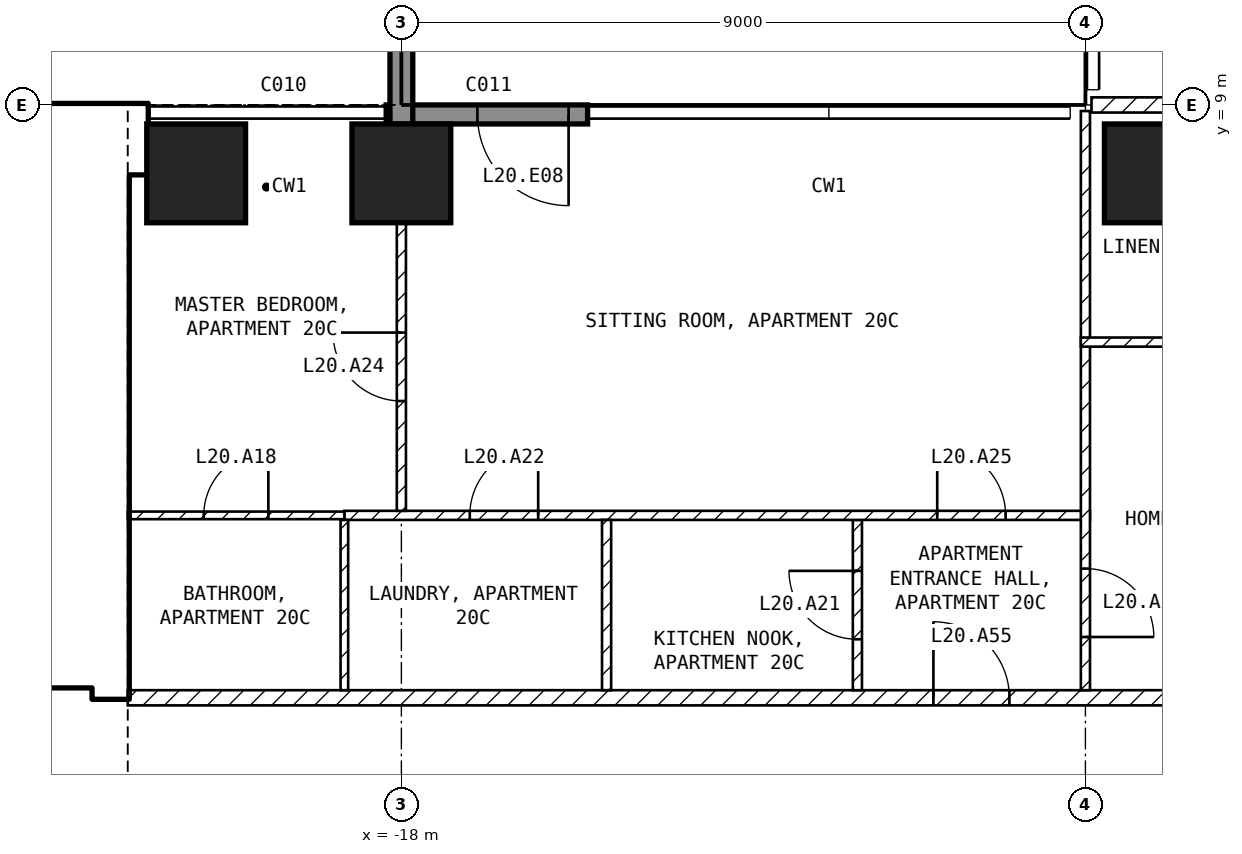
"""IFC4 building model, lengths in metres.
Left out: names, types, materials, properties, quantities, classifications, styles, units other than length and angle.
Written with IfcOpenShell. Run it as: python <this file> out.ifc"""

import sys

from ifc_helpers import new_model, si_unit, direction, frame, frame_2d, origin, origin_2d, place, context, subcontext, project, spatial, rectangle, extrude, element, fill, save


model = new_model("IFC4")
c1 = context("Model", 3, precision=1e-05, world=origin(), true_north=direction((0.0, 1.0)))
c2 = subcontext(c1, "Body", "Model", "MODEL_VIEW")
j1 = project(units=[si_unit("LENGTHUNIT", "METRE"), si_unit("PLANEANGLEUNIT", "RADIAN")], contexts=[c1])
p1 = place(None, origin())
s1 = spatial("IfcSite", under=j1, at=p1, CompositionType="ELEMENT")
p2 = place(p1, origin())
s2 = spatial("IfcBuilding", under=s1, at=p2, CompositionType="ELEMENT")
p3 = place(p2, frame((0.0, 0.0, 89.0)))
s3 = spatial("IfcBuildingStorey", under=s2, at=p3, CompositionType="ELEMENT", Elevation=89.0)
for number, where, z_axis, x_axis in (
    (1, (-20.7, 8.1, -0.25), (0.0, 0.0, 1.0), (1.0, 0.0, 0.0)),
    (2, (-18.0, 8.1, -0.25), (0.0, 0.0, 1.0), (1.0, 0.0, 0.0)),
    (3, (-8.1, 8.1, -0.25), (0.0, 0.0, 1.0), (1.0, 0.0, 0.0)),
):
    element("IfcColumn", number, at=place(p3, frame(where, z_axis=z_axis, x_axis=x_axis)), inside=s3, PredefinedType="COLUMN", context=c2, shape_type="SweptSolid", body=[
        extrude(rectangle(XDim=1.3, YDim=1.3, at=origin_2d()), origin(), (0.0, 0.0, 1.0), 3.45),
    ])
p4 = place(p3, frame((-15.55, 8.875, 0.0), z_axis=(0.0, 0.0, 1.0), x_axis=(-1.0, 0.0, 0.0)))
e4 = element("IfcWall", 4, at=p4, inside=s3, PredefinedType="SOLIDWALL", context=c2, shape_type="SweptSolid", body=[
    extrude(rectangle(XDim=2.65, YDim=0.25, at=frame_2d((1.325, 0.0))), origin(), (0.0, 0.0, 1.0), 3.2),
])
p5 = place(p4, frame((0.25, 0.0, 0.0)))
e5 = element("IfcOpeningElement", 5, at=p5, cuts=e4, PredefinedType="OPENING", context=c2, shape_type="SweptSolid", body=[
    extrude(rectangle(XDim=1.2, YDim=2.4, at=frame_2d((0.6, 1.2))), frame((0.0, 0.135, 0.0), z_axis=(0.0, -1.0, 0.0), x_axis=(1.0, 0.0, 0.0)), (0.0, 0.0, 1.0), 0.27),
])
p6 = place(p3, frame((-18.0, 8.75, 0.0), z_axis=(0.0, 0.0, 1.0), x_axis=(0.0, 1.0, 0.0)))
e6 = element("IfcWall", 6, at=p6, inside=s3, PredefinedType="SOLIDWALL", context=c2, shape_type="SweptSolid", body=[
    extrude(rectangle(XDim=2.95, YDim=0.3, at=frame_2d((1.475, 0.0))), origin(), (0.0, 0.0, 1.0), 3.2),
])
p7 = place(p3, frame((-31.5, 8.55, 0.0), z_axis=(0.0, 0.0, 1.0), x_axis=(1.0, 0.0, 0.0)))
e7 = element("IfcWall", 7, at=p7, inside=s3, PredefinedType="SHEAR", context=c2, shape_type="SweptSolid", body=[
    extrude(rectangle(XDim=10.15, YDim=0.9, at=frame_2d((5.075, 0.0))), origin(), (0.0, 0.0, 1.0), 3.2),
])
p8 = place(p3, frame((-21.825, 1.2, 0.0), z_axis=(0.0, 0.0, 1.0), x_axis=(0.0, 1.0, 0.0)))
e8 = element("IfcWall", 8, at=p8, inside=s3, PredefinedType="SHEAR", context=c2, shape_type="SweptSolid", body=[
    extrude(rectangle(XDim=6.9, YDim=0.45, at=frame_2d((3.45, 0.0))), origin(), (0.0, 0.0, 1.0), 3.2),
])
p9 = place(p3, frame((-35.1, 1.45, 0.0), z_axis=(0.0, 0.0, 1.0), x_axis=(1.0, 0.0, 0.0)))
e9 = element("IfcWall", 9, at=p9, inside=s3, PredefinedType="SOLIDWALL", context=c2, shape_type="SweptSolid", body=[
    extrude(rectangle(XDim=13.05, YDim=0.2, at=frame_2d((6.525, 0.0))), origin(), (0.0, 0.0, 1.0), 3.2),
])
p10 = place(p9, frame((11.3, 0.0, 0.0)))
e10 = element("IfcOpeningElement", 10, at=p10, cuts=e9, PredefinedType="OPENING", context=c2, shape_type="SweptSolid", body=[
    extrude(rectangle(XDim=1.0, YDim=2.1, at=frame_2d((0.5, 1.05))), frame((0.0, 0.11, 0.0), z_axis=(0.0, -1.0, 0.0), x_axis=(1.0, 0.0, 0.0)), (0.0, 0.0, 1.0), 0.22),
])
p11 = place(p9, frame((8.8, 0.0, 0.0)))
e11 = element("IfcOpeningElement", 11, at=p11, cuts=e9, PredefinedType="OPENING", context=c2, shape_type="SweptSolid", body=[
    extrude(rectangle(XDim=1.0, YDim=2.1, at=frame_2d((0.5, 1.05))), frame((0.0, 0.11, 0.0), z_axis=(0.0, -1.0, 0.0), x_axis=(1.0, 0.0, 0.0)), (0.0, 0.0, 1.0), 0.22),
])
p12 = place(p3, frame((-28.35, 5.15, 0.0), z_axis=(0.0, 0.0, 1.0), x_axis=(1.0, 0.0, 0.0)))
e12 = element("IfcWall", 12, at=p12, inside=s3, PredefinedType="SOLIDWALL", context=c2, shape_type="SweptSolid", body=[
    extrude(rectangle(XDim=6.3, YDim=0.2, at=frame_2d((3.15, 0.0))), origin(), (0.0, 0.0, 1.0), 3.2),
])
p13 = place(p12, frame((5.1, 0.0, 0.0)))
e13 = element("IfcOpeningElement", 13, at=p13, cuts=e12, PredefinedType="OPENING", context=c2, shape_type="SweptSolid", body=[
    extrude(rectangle(XDim=1.0, YDim=2.1, at=frame_2d((0.5, 1.05))), frame((0.0, 0.11, 0.0), z_axis=(0.0, -1.0, 0.0), x_axis=(1.0, 0.0, 0.0)), (0.0, 0.0, 1.0), 0.22),
])
p14 = place(p3, frame((-21.6, 1.2, 0.0), z_axis=(0.0, 0.0, 1.0), x_axis=(1.0, 0.0, 0.0)))
e14 = element("IfcWall", 14, at=p14, inside=s3, PredefinedType="PARTITIONING", context=c2, shape_type="SweptSolid", body=[
    extrude(rectangle(XDim=20.5, YDim=0.2, at=frame_2d((10.25, 0.0))), origin(), (0.0, 0.0, 1.0), 3.2),
])
p15 = place(p14, frame((10.6, 0.0, 0.0)))
e15 = element("IfcOpeningElement", 15, at=p15, cuts=e14, PredefinedType="OPENING", context=c2, shape_type="SweptSolid", body=[
    extrude(rectangle(XDim=1.0, YDim=2.1, at=frame_2d((0.5, 1.05))), frame((0.0, 0.11, 0.0), z_axis=(0.0, -1.0, 0.0), x_axis=(1.0, 0.0, 0.0)), (0.0, 0.0, 1.0), 0.22),
])
p16 = place(p3, frame((-8.92, 9.0, 0.0), z_axis=(0.0, 0.0, 1.0), x_axis=(1.0, 0.0, 0.0)))
e16 = element("IfcWall", 16, at=p16, inside=s3, PredefinedType="PARTITIONING", context=c2, shape_type="SweptSolid", body=[
    extrude(rectangle(XDim=17.84, YDim=0.2, at=frame_2d((8.92, 0.0))), origin(), (0.0, 0.0, 1.0), 3.2),
])
p17 = place(p16, frame((8.42, 0.0, 0.0)))
e17 = element("IfcOpeningElement", 17, at=p17, cuts=e16, PredefinedType="OPENING", context=c2, shape_type="SweptSolid", body=[
    extrude(rectangle(XDim=1.0, YDim=2.1, at=frame_2d((0.5, 1.05))), frame((0.0, 0.11, 0.0), z_axis=(0.0, -1.0, 0.0), x_axis=(1.0, 0.0, 0.0)), (0.0, 0.0, 1.0), 0.22),
])
p18 = place(p3, frame((-12.0, 1.3, 0.0), z_axis=(0.0, 0.0, 1.0), x_axis=(0.0, 1.0, 0.0)))
e18 = element("IfcWall", 18, at=p18, inside=s3, PredefinedType="PARTITIONING", context=c2, shape_type="SweptSolid", body=[
    extrude(rectangle(XDim=2.24, YDim=0.12, at=frame_2d((1.12, 0.0))), origin(), (0.0, 0.0, 1.0), 3.2),
])
p19 = place(p18, frame((0.67, 0.0, 0.0)))
e19 = element("IfcOpeningElement", 19, at=p19, cuts=e18, PredefinedType="OPENING", context=c2, shape_type="SweptSolid", body=[
    extrude(rectangle(XDim=0.9, YDim=2.1, at=frame_2d((0.45, 1.05))), frame((0.0, 0.07, 0.0), z_axis=(0.0, -1.0, 0.0), x_axis=(1.0, 0.0, 0.0)), (0.0, 0.0, 1.0), 0.14),
])
p20 = place(p3, frame((-18.75, 3.6, 0.0), z_axis=(0.0, 0.0, 1.0), x_axis=(1.0, 0.0, 0.0)))
e20 = element("IfcWall", 20, at=p20, inside=s3, PredefinedType="PARTITIONING", context=c2, shape_type="SweptSolid", body=[
    extrude(rectangle(XDim=9.81, YDim=0.12, at=frame_2d((4.905, 0.0))), origin(), (0.0, 0.0, 1.0), 3.2),
])
p21 = place(p20, frame((1.65, 0.0, 0.0)))
e21 = element("IfcOpeningElement", 21, at=p21, cuts=e20, PredefinedType="OPENING", context=c2, shape_type="SweptSolid", body=[
    extrude(rectangle(XDim=0.9, YDim=2.1, at=frame_2d((0.45, 1.05))), frame((0.0, 0.07, 0.0), z_axis=(0.0, -1.0, 0.0), x_axis=(1.0, 0.0, 0.0)), (0.0, 0.0, 1.0), 0.14),
])
p22 = place(p20, frame((7.8, 0.0, 0.0)))
e22 = element("IfcOpeningElement", 22, at=p22, cuts=e20, PredefinedType="OPENING", context=c2, shape_type="SweptSolid", body=[
    extrude(rectangle(XDim=0.9, YDim=2.1, at=frame_2d((0.45, 1.05))), frame((0.0, 0.07, 0.0), z_axis=(0.0, -1.0, 0.0), x_axis=(1.0, 0.0, 0.0)), (0.0, 0.0, 1.0), 0.14),
])
p23 = place(p3, frame((-9.0, 8.92, 0.0), z_axis=(0.0, 0.0, 1.0), x_axis=(0.0, -1.0, 0.0)))
e23 = element("IfcWall", 23, at=p23, inside=s3, PredefinedType="PARTITIONING", context=c2, shape_type="SweptSolid", body=[
    extrude(rectangle(XDim=7.62, YDim=0.12, at=frame_2d((3.81, 0.0))), origin(), (0.0, 0.0, 1.0), 3.2),
])
p24 = place(p23, frame((6.02, 0.0, 0.0)))
e24 = element("IfcOpeningElement", 24, at=p24, cuts=e23, PredefinedType="OPENING", context=c2, shape_type="SweptSolid", body=[
    extrude(rectangle(XDim=0.9, YDim=2.1, at=frame_2d((0.45, 1.05))), frame((0.0, 0.07, 0.0), z_axis=(0.0, -1.0, 0.0), x_axis=(1.0, 0.0, 0.0)), (0.0, 0.0, 1.0), 0.14),
])
p25 = place(p3, frame((-15.3, 1.3, 0.0), z_axis=(0.0, 0.0, 1.0), x_axis=(0.0, 1.0, 0.0)))
e25 = element("IfcWall", 25, at=p25, inside=s3, PredefinedType="PARTITIONING", context=c2, shape_type="SweptSolid", body=[
    extrude(rectangle(XDim=2.24, YDim=0.12, at=frame_2d((1.12, 0.0))), origin(), (0.0, 0.0, 1.0), 3.2),
])
p26 = place(p3, frame((-18.75, 1.3, 0.0), z_axis=(0.0, 0.0, 1.0), x_axis=(0.0, 1.0, 0.0)))
e26 = element("IfcWall", 26, at=p26, inside=s3, PredefinedType="PARTITIONING", context=c2, shape_type="SweptSolid", body=[
    extrude(rectangle(XDim=2.24, YDim=0.1, at=frame_2d((1.12, 0.0))), origin(), (0.0, 0.0, 1.0), 3.2),
])
p27 = place(p3, frame((-21.6, 3.6, 0.0), z_axis=(0.0, 0.0, 1.0), x_axis=(1.0, 0.0, 0.0)))
e27 = element("IfcWall", 27, at=p27, inside=s3, PredefinedType="PARTITIONING", context=c2, shape_type="SweptSolid", body=[
    extrude(rectangle(XDim=2.85, YDim=0.1, at=frame_2d((1.425, 0.0))), origin(), (0.0, 0.0, 1.0), 3.2),
])
p28 = place(p27, frame((1.0, 0.0, 0.0)))
e28 = element("IfcOpeningElement", 28, at=p28, cuts=e27, PredefinedType="OPENING", context=c2, shape_type="SweptSolid", body=[
    extrude(rectangle(XDim=0.85, YDim=2.1, at=frame_2d((0.425, 1.05))), frame((0.0, 0.06, 0.0), z_axis=(0.0, -1.0, 0.0), x_axis=(1.0, 0.0, 0.0)), (0.0, 0.0, 1.0), 0.12),
])
p29 = place(p3, frame((-18.0, 3.66, 0.0), z_axis=(0.0, 0.0, 1.0), x_axis=(0.0, 1.0, 0.0)))
e29 = element("IfcWall", 29, at=p29, inside=s3, PredefinedType="PARTITIONING", context=c2, shape_type="SweptSolid", body=[
    extrude(rectangle(XDim=3.79, YDim=0.12, at=frame_2d((1.895, 0.0))), origin(), (0.0, 0.0, 1.0), 2.296),
])
p30 = place(p29, frame((1.445, 0.0, 0.0)))
e30 = element("IfcOpeningElement", 30, at=p30, cuts=e29, PredefinedType="OPENING", context=c2, shape_type="SweptSolid", body=[
    extrude(rectangle(XDim=0.9, YDim=2.1, at=frame_2d((0.45, 1.05))), frame((0.0, 0.07, 0.0), z_axis=(0.0, -1.0, 0.0), x_axis=(1.0, 0.0, 0.0)), (0.0, 0.0, 1.0), 0.14),
])
p31 = place(p3, frame((-9.06, 5.88, 0.0), z_axis=(0.0, 0.0, 1.0), x_axis=(1.0, 0.0, 0.0)))
e31 = element("IfcWall", 31, at=p31, inside=s3, PredefinedType="PARTITIONING", context=c2, shape_type="SweptSolid", body=[
    extrude(rectangle(XDim=4.62, YDim=0.12, at=frame_2d((2.31, 0.0))), origin(), (0.0, 0.0, 1.0), 3.2),
])
p32 = place(p31, frame((1.86, 0.0, 0.0)))
e32 = element("IfcOpeningElement", 32, at=p32, cuts=e31, PredefinedType="OPENING", context=c2, shape_type="SweptSolid", body=[
    extrude(rectangle(XDim=0.9, YDim=2.1, at=frame_2d((0.45, 1.05))), frame((0.0, 0.07, 0.0), z_axis=(0.0, -1.0, 0.0), x_axis=(1.0, 0.0, 0.0)), (0.0, 0.0, 1.0), 0.14),
])
p33 = place(p5, origin())
e33 = element("IfcDoor", 33, at=p33, inside=s3, OperationType="SINGLE_SWING_LEFT", PredefinedType="DOOR", context=c2, shape_type="SweptSolid", body=[
    extrude(rectangle(XDim=1.2, YDim=2.4, at=frame_2d((0.6, 1.2))), frame((0.0, 0.025, 0.0), z_axis=(0.0, -1.0, 0.0), x_axis=(1.0, 0.0, 0.0)), (0.0, 0.0, 1.0), 0.05),
])
fill(e5, e33)
p34 = place(p13, origin())
e34 = element("IfcDoor", 34, at=p34, inside=s3, OperationType="SINGLE_SWING_LEFT", PredefinedType="DOOR", context=c2, shape_type="SweptSolid", body=[
    extrude(rectangle(XDim=1.0, YDim=2.1, at=frame_2d((0.5, 1.05))), frame((0.0, 0.025, 0.0), z_axis=(0.0, -1.0, 0.0), x_axis=(1.0, 0.0, 0.0)), (0.0, 0.0, 1.0), 0.05),
])
fill(e13, e34)
p35 = place(p28, origin())
e35 = element("IfcDoor", 35, at=p35, inside=s3, OperationType="SINGLE_SWING_RIGHT", PredefinedType="DOOR", context=c2, shape_type="SweptSolid", body=[
    extrude(rectangle(XDim=0.85, YDim=2.1, at=frame_2d((0.425, 1.05))), frame((0.0, 0.025, 0.0), z_axis=(0.0, -1.0, 0.0), x_axis=(1.0, 0.0, 0.0)), (0.0, 0.0, 1.0), 0.05),
])
fill(e28, e35)
p36 = place(p24, origin())
e36 = element("IfcDoor", 36, at=p36, inside=s3, OperationType="SINGLE_SWING_RIGHT", PredefinedType="DOOR", context=c2, shape_type="SweptSolid", body=[
    extrude(rectangle(XDim=0.9, YDim=2.1, at=frame_2d((0.45, 1.05))), frame((0.0, 0.025, 0.0), z_axis=(0.0, -1.0, 0.0), x_axis=(1.0, 0.0, 0.0)), (0.0, 0.0, 1.0), 0.05),
])
fill(e24, e36)
p37 = place(p19, origin())
e37 = element("IfcDoor", 37, at=p37, inside=s3, OperationType="SINGLE_SWING_RIGHT", PredefinedType="DOOR", context=c2, shape_type="SweptSolid", body=[
    extrude(rectangle(XDim=0.9, YDim=2.1, at=frame_2d((0.45, 1.05))), frame((0.0, 0.025, 0.0), z_axis=(0.0, -1.0, 0.0), x_axis=(1.0, 0.0, 0.0)), (0.0, 0.0, 1.0), 0.05),
])
fill(e19, e37)
p38 = place(p21, origin())
e38 = element("IfcDoor", 38, at=p38, inside=s3, OperationType="SINGLE_SWING_RIGHT", PredefinedType="DOOR", context=c2, shape_type="SweptSolid", body=[
    extrude(rectangle(XDim=0.9, YDim=2.1, at=frame_2d((0.45, 1.05))), frame((0.0, 0.025, 0.0), z_axis=(0.0, -1.0, 0.0), x_axis=(1.0, 0.0, 0.0)), (0.0, 0.0, 1.0), 0.05),
])
fill(e21, e38)
p39 = place(p30, origin())
e39 = element("IfcDoor", 39, at=p39, inside=s3, OperationType="SINGLE_SWING_RIGHT", PredefinedType="DOOR", context=c2, shape_type="SweptSolid", body=[
    extrude(rectangle(XDim=0.9, YDim=2.1, at=frame_2d((0.45, 1.05))), frame((0.0, 0.025, 0.0), z_axis=(0.0, -1.0, 0.0), x_axis=(1.0, 0.0, 0.0)), (0.0, 0.0, 1.0), 0.05),
])
fill(e30, e39)
p40 = place(p22, origin())
e40 = element("IfcDoor", 40, at=p40, inside=s3, OperationType="SINGLE_SWING_LEFT", PredefinedType="DOOR", context=c2, shape_type="SweptSolid", body=[
    extrude(rectangle(XDim=0.9, YDim=2.1, at=frame_2d((0.45, 1.05))), frame((0.0, 0.025, 0.0), z_axis=(0.0, -1.0, 0.0), x_axis=(1.0, 0.0, 0.0)), (0.0, 0.0, 1.0), 0.05),
])
fill(e22, e40)
p41 = place(p15, origin())
e41 = element("IfcDoor", 41, at=p41, inside=s3, OperationType="SINGLE_SWING_LEFT", PredefinedType="DOOR", context=c2, shape_type="SweptSolid", body=[
    extrude(rectangle(XDim=1.0, YDim=2.1, at=frame_2d((0.5, 1.05))), frame((0.0, 0.025, 0.0), z_axis=(0.0, -1.0, 0.0), x_axis=(1.0, 0.0, 0.0)), (0.0, 0.0, 1.0), 0.05),
])
fill(e15, e41)
save(model, sys.argv[1])
